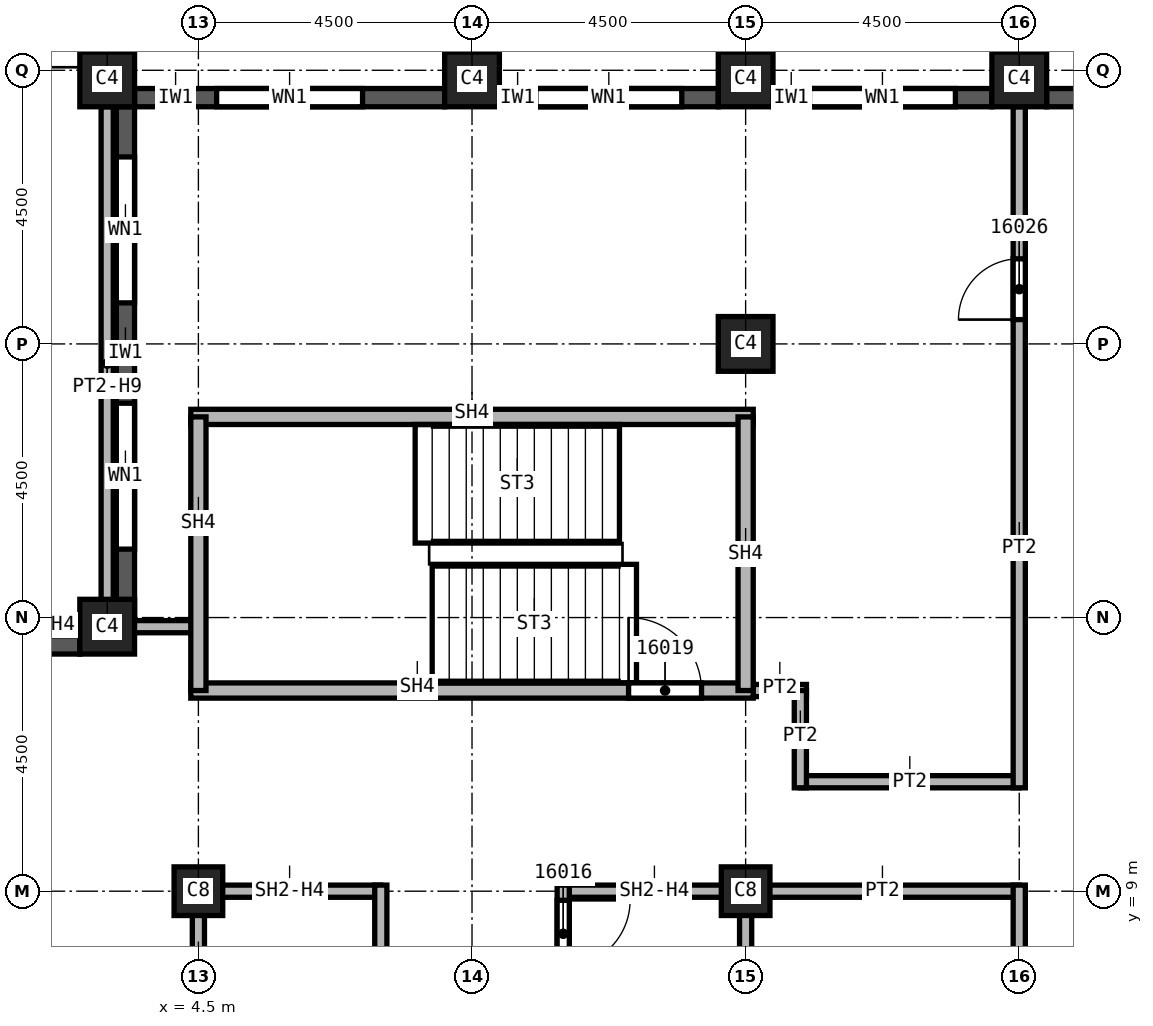
"""IFC4 building model, lengths in metres.
Left out: names, types, materials, properties, quantities, classifications, styles, units other than length and angle.
Written with IfcOpenShell. Run it as: python <this file> out.ifc"""

import sys

from ifc_helpers import new_model, si_unit, direction, frame, frame_2d, origin, origin_2d, place, context, subcontext, project, spatial, rectangle, extrude, element, fill, save


model = new_model("IFC4")
c1 = context("Model", 3, precision=1e-05, world=origin(), true_north=direction((0.0, 1.0)))
c2 = subcontext(c1, "Body", "Model", "MODEL_VIEW")
j1 = project(units=[si_unit("LENGTHUNIT", "METRE"), si_unit("PLANEANGLEUNIT", "RADIAN")], contexts=[c1])
p1 = place(None, origin())
s1 = spatial("IfcSite", under=j1, at=p1, CompositionType="ELEMENT")
p2 = place(p1, origin())
s2 = spatial("IfcBuilding", under=s1, at=p2, CompositionType="ELEMENT")
p3 = place(p2, frame((0.0, 0.0, 242.0)))
s3 = spatial("IfcBuildingStorey", under=s2, at=p3, CompositionType="ELEMENT", Elevation=242.0)
p4 = place(p3, frame((13.5, 18.0, 0.0), z_axis=(0.0, 0.0, 1.0), x_axis=(1.0, 0.0, 0.0)))
e1 = element("IfcColumn", 1, at=p4, inside=s3, PredefinedType="COLUMN", context=c2, shape_type="SweptSolid", body=[
    extrude(rectangle(XDim=0.9, YDim=0.9, at=origin_2d()), origin(), (0.0, 0.0, 1.0), 3.72),
])
for number, where, z_axis, x_axis in (
    (2, (4.5, 9.0, 0.0), (0.0, 0.0, 1.0), (1.0, 0.0, 0.0)),
    (3, (13.5, 9.0, 0.0), (0.0, 0.0, 1.0), (1.0, 0.0, 0.0)),
):
    element("IfcColumn", number, at=place(p3, frame(where, z_axis=z_axis, x_axis=x_axis)), inside=s3, PredefinedType="COLUMN", context=c2, shape_type="SweptSolid", body=[
        extrude(rectangle(XDim=0.8, YDim=0.8, at=origin_2d()), origin(), (0.0, 0.0, 1.0), 3.72),
    ])
for number, where, z_axis, x_axis in (
    (4, (3.0, 22.35, 0.0), (0.0, 0.0, 1.0), (1.0, 0.0, 0.0)),
    (5, (9.0, 22.35, 0.0), (0.0, 0.0, 1.0), (1.0, 0.0, 0.0)),
    (6, (13.5, 22.35, 0.0), (0.0, 0.0, 1.0), (1.0, 0.0, 0.0)),
    (7, (18.0, 22.35, 0.0), (0.0, 0.0, 1.0), (1.0, 0.0, 0.0)),
    (8, (3.0, 13.35, 0.0), (0.0, 0.0, 1.0), (1.0, 0.0, 0.0)),
):
    element("IfcColumn", number, at=place(p3, frame(where, z_axis=z_axis, x_axis=x_axis)), inside=s3, PredefinedType="COLUMN", context=c2, shape_type="SweptSolid", body=[
        extrude(rectangle(XDim=0.9, YDim=0.9, at=origin_2d()), origin(), (0.0, 0.0, 1.0), 3.72),
    ])
p5 = place(p3, frame((22.05, 22.05, 0.0), z_axis=(0.0, 0.0, 1.0), x_axis=(-1.0, 0.0, 0.0)))
e9 = element("IfcWall", 9, at=p5, inside=s3, PredefinedType="SOLIDWALL", context=c2, shape_type="SweptSolid", body=[
    extrude(rectangle(XDim=3.6, YDim=0.3, at=frame_2d((1.8, 0.0))), origin(), (0.0, 0.0, 1.0), 3.12),
])
p6 = place(p5, frame((0.775, 0.0, 0.8)))
e10 = element("IfcOpeningElement", 10, at=p6, cuts=e9, PredefinedType="OPENING", context=c2, shape_type="SweptSolid", body=[
    extrude(rectangle(XDim=1.0, YDim=1.95, at=frame_2d((0.5, 0.975))), frame((0.0, 0.15, 0.0), z_axis=(0.0, -1.0, 0.0), x_axis=(1.0, 0.0, 0.0)), (0.0, 0.0, 1.0), 0.3),
])
p7 = place(p5, frame((2.375, 0.0, 0.8)))
e11 = element("IfcOpeningElement", 11, at=p7, cuts=e9, PredefinedType="OPENING", context=c2, shape_type="SweptSolid", body=[
    extrude(rectangle(XDim=0.6, YDim=1.95, at=frame_2d((0.3, 0.975))), frame((0.0, 0.15, 0.0), z_axis=(0.0, -1.0, 0.0), x_axis=(1.0, 0.0, 0.0)), (0.0, 0.0, 1.0), 0.3),
])
p8 = place(p3, frame((17.55, 22.05, 0.0), z_axis=(0.0, 0.0, 1.0), x_axis=(-1.0, 0.0, 0.0)))
e12 = element("IfcWall", 12, at=p8, inside=s3, PredefinedType="SOLIDWALL", context=c2, shape_type="SweptSolid", body=[
    extrude(rectangle(XDim=3.6, YDim=0.3, at=frame_2d((1.8, 0.0))), origin(), (0.0, 0.0, 1.0), 3.12),
])
p9 = place(p8, frame((0.6, 0.0, 0.8)))
e13 = element("IfcOpeningElement", 13, at=p9, cuts=e12, PredefinedType="OPENING", context=c2, shape_type="SweptSolid", body=[
    extrude(rectangle(XDim=2.4, YDim=1.95, at=frame_2d((1.2, 0.975))), frame((0.0, 0.15, 0.0), z_axis=(0.0, -1.0, 0.0), x_axis=(1.0, 0.0, 0.0)), (0.0, 0.0, 1.0), 0.3),
])
p10 = place(p3, frame((13.05, 22.05, 0.0), z_axis=(0.0, 0.0, 1.0), x_axis=(-1.0, 0.0, 0.0)))
e14 = element("IfcWall", 14, at=p10, inside=s3, PredefinedType="SOLIDWALL", context=c2, shape_type="SweptSolid", body=[
    extrude(rectangle(XDim=3.6, YDim=0.3, at=frame_2d((1.8, 0.0))), origin(), (0.0, 0.0, 1.0), 3.12),
])
p11 = place(p10, frame((0.6, 0.0, 0.8)))
e15 = element("IfcOpeningElement", 15, at=p11, cuts=e14, PredefinedType="OPENING", context=c2, shape_type="SweptSolid", body=[
    extrude(rectangle(XDim=2.4, YDim=1.95, at=frame_2d((1.2, 0.975))), frame((0.0, 0.15, 0.0), z_axis=(0.0, -1.0, 0.0), x_axis=(1.0, 0.0, 0.0)), (0.0, 0.0, 1.0), 0.3),
])
p12 = place(p3, frame((8.55, 22.05, 0.0), z_axis=(0.0, 0.0, 1.0), x_axis=(-1.0, 0.0, 0.0)))
e16 = element("IfcWall", 16, at=p12, inside=s3, PredefinedType="SOLIDWALL", context=c2, shape_type="SweptSolid", body=[
    extrude(rectangle(XDim=5.1, YDim=0.3, at=frame_2d((2.55, 0.0))), origin(), (0.0, 0.0, 1.0), 3.12),
])
p13 = place(p12, frame((1.35, 0.0, 0.8)))
e17 = element("IfcOpeningElement", 17, at=p13, cuts=e16, PredefinedType="OPENING", context=c2, shape_type="SweptSolid", body=[
    extrude(rectangle(XDim=2.4, YDim=1.95, at=frame_2d((1.2, 0.975))), frame((0.0, 0.15, 0.0), z_axis=(0.0, -1.0, 0.0), x_axis=(1.0, 0.0, 0.0)), (0.0, 0.0, 1.0), 0.3),
])
p14 = place(p3, frame((3.3, 21.9, 0.0), z_axis=(0.0, 0.0, 1.0), x_axis=(0.0, -1.0, 0.0)))
e18 = element("IfcWall", 18, at=p14, inside=s3, PredefinedType="SOLIDWALL", context=c2, shape_type="SweptSolid", body=[
    extrude(rectangle(XDim=8.5, YDim=0.3, at=frame_2d((4.25, 0.0))), origin(), (0.0, 0.0, 1.0), 3.12),
])
p15 = place(p14, frame((0.825, 0.0, 0.8)))
e19 = element("IfcOpeningElement", 19, at=p15, cuts=e18, PredefinedType="OPENING", context=c2, shape_type="SweptSolid", body=[
    extrude(rectangle(XDim=2.4, YDim=1.95, at=frame_2d((1.2, 0.975))), frame((0.0, 0.15, 0.0), z_axis=(0.0, -1.0, 0.0), x_axis=(1.0, 0.0, 0.0)), (0.0, 0.0, 1.0), 0.3),
])
p16 = place(p14, frame((4.875, 0.0, 0.8)))
e20 = element("IfcOpeningElement", 20, at=p16, cuts=e18, PredefinedType="OPENING", context=c2, shape_type="SweptSolid", body=[
    extrude(rectangle(XDim=2.4, YDim=1.95, at=frame_2d((1.2, 0.975))), frame((0.0, 0.15, 0.0), z_axis=(0.0, -1.0, 0.0), x_axis=(1.0, 0.0, 0.0)), (0.0, 0.0, 1.0), 0.3),
])
p17 = place(p3, frame((-2.55, 13.05, 0.0), z_axis=(0.0, 0.0, 1.0), x_axis=(1.0, 0.0, 0.0)))
e21 = element("IfcWall", 21, at=p17, inside=s3, PredefinedType="SOLIDWALL", context=c2, shape_type="SweptSolid", body=[
    extrude(rectangle(XDim=5.1, YDim=0.3, at=frame_2d((2.55, 0.0))), origin(), (0.0, 0.0, 1.0), 3.12),
])
p18 = place(p17, frame((1.95, 0.0, 0.0)))
e22 = element("IfcOpeningElement", 22, at=p18, cuts=e21, PredefinedType="OPENING", context=c2, shape_type="SweptSolid", body=[
    extrude(rectangle(XDim=1.2, YDim=2.4, at=frame_2d((0.6, 1.2))), frame((0.0, 0.15, 0.0), z_axis=(0.0, -1.0, 0.0), x_axis=(1.0, 0.0, 0.0)), (0.0, 0.0, 1.0), 0.3),
])
p19 = place(p3, frame((0.9, 13.35, 0.0), z_axis=(0.0, 0.0, 1.0), x_axis=(1.0, 0.0, 0.0)))
e23 = element("IfcWall", 23, at=p19, inside=s3, PredefinedType="PARTITIONING", context=c2, shape_type="SweptSolid", body=[
    extrude(rectangle(XDim=3.6, YDim=0.2, at=frame_2d((1.8, 0.0))), origin(), (0.0, 0.0, 1.0), 3.118),
])
p20 = place(p3, frame((3.0, 21.9, 0.0), z_axis=(0.0, 0.0, 1.0), x_axis=(0.0, -1.0, 0.0)))
e24 = element("IfcWall", 24, at=p20, inside=s3, PredefinedType="PARTITIONING", context=c2, shape_type="SweptSolid", body=[
    extrude(rectangle(XDim=8.55, YDim=0.2, at=frame_2d((4.275, 0.0))), origin(), (0.0, 0.0, 1.0), 2.874),
])
p21 = place(p3, frame((13.375, 12.3, 0.0), z_axis=(0.0, 0.0, 1.0), x_axis=(1.0, 0.0, 0.0)))
e25 = element("IfcWall", 25, at=p21, inside=s3, PredefinedType="PARTITIONING", context=c2, shape_type="SweptSolid", body=[
    extrude(rectangle(XDim=1.125, YDim=0.2, at=frame_2d((0.562, 0.0))), origin(), (0.0, 0.0, 1.0), 3.72),
])
p22 = place(p3, frame((18.0, 9.0, 0.0), z_axis=(0.0, 0.0, 1.0), x_axis=(-1.0, 0.0, 0.0)))
e26 = element("IfcWall", 26, at=p22, inside=s3, PredefinedType="PARTITIONING", context=c2, shape_type="SweptSolid", body=[
    extrude(rectangle(XDim=4.5, YDim=0.2, at=frame_2d((2.25, 0.0))), origin(), (0.0, 0.0, 1.0), 3.72),
])
p23 = place(p3, frame((14.4, 10.8, 0.0), z_axis=(0.0, 0.0, 1.0), x_axis=(1.0, 0.0, 0.0)))
e27 = element("IfcWall", 27, at=p23, inside=s3, PredefinedType="PARTITIONING", context=c2, shape_type="SweptSolid", body=[
    extrude(rectangle(XDim=3.6, YDim=0.2, at=frame_2d((1.8, 0.0))), origin(), (0.0, 0.0, 1.0), 3.72),
])
p24 = place(p3, frame((14.4, 12.3, 0.0), z_axis=(0.0, 0.0, 1.0), x_axis=(0.0, -1.0, 0.0)))
e28 = element("IfcWall", 28, at=p24, inside=s3, PredefinedType="PARTITIONING", context=c2, shape_type="SweptSolid", body=[
    extrude(rectangle(XDim=1.6, YDim=0.2, at=frame_2d((0.8, 0.0))), origin(), (0.0, 0.0, 1.0), 3.72),
])
p25 = place(p3, frame((18.0, -9.1, 0.0), z_axis=(0.0, 0.0, 1.0), x_axis=(0.0, 1.0, 0.0)))
e29 = element("IfcWall", 29, at=p25, inside=s3, PredefinedType="PARTITIONING", context=c2, shape_type="SweptSolid", body=[
    extrude(rectangle(XDim=18.2, YDim=0.2, at=frame_2d((9.1, 0.0))), origin(), (0.0, 0.0, 1.0), 3.72),
])
p26 = place(p25, frame((4.6, 0.0, 0.0)))
e30 = element("IfcOpeningElement", 30, at=p26, cuts=e29, PredefinedType="OPENING", context=c2, shape_type="SweptSolid", body=[
    extrude(rectangle(XDim=1.0, YDim=2.1, at=frame_2d((0.5, 1.05))), frame((0.0, 0.1, 0.0), z_axis=(0.0, -1.0, 0.0), x_axis=(1.0, 0.0, 0.0)), (0.0, 0.0, 1.0), 0.2),
])
p27 = place(p25, frame((13.75, 0.0, 0.0)))
e31 = element("IfcOpeningElement", 31, at=p27, cuts=e29, PredefinedType="OPENING", context=c2, shape_type="SweptSolid", body=[
    extrude(rectangle(XDim=1.0, YDim=2.1, at=frame_2d((0.5, 1.05))), frame((0.0, 0.1, 0.0), z_axis=(0.0, -1.0, 0.0), x_axis=(1.0, 0.0, 0.0)), (0.0, 0.0, 1.0), 0.2),
])
p28 = place(p3, frame((18.0, 10.7, 0.0), z_axis=(0.0, 0.0, 1.0), x_axis=(0.0, 1.0, 0.0)))
e32 = element("IfcWall", 32, at=p28, inside=s3, PredefinedType="PARTITIONING", context=c2, shape_type="SweptSolid", body=[
    extrude(rectangle(XDim=11.2, YDim=0.2, at=frame_2d((5.6, 0.0))), origin(), (0.0, 0.0, 1.0), 3.72),
])
p29 = place(p28, frame((7.7, 0.0, 0.0)))
e33 = element("IfcOpeningElement", 33, at=p29, cuts=e32, PredefinedType="OPENING", context=c2, shape_type="SweptSolid", body=[
    extrude(rectangle(XDim=1.0, YDim=2.1, at=frame_2d((0.5, 1.05))), frame((0.0, 0.1, 0.0), z_axis=(0.0, -1.0, 0.0), x_axis=(1.0, 0.0, 0.0)), (0.0, 0.0, 1.0), 0.2),
])
p30 = place(p3, frame((4.5, 0.0, 0.0), z_axis=(0.0, 0.0, 1.0), x_axis=(0.0, 1.0, 0.0)))
e34 = element("IfcWall", 34, at=p30, inside=s3, PredefinedType="SOLIDWALL", context=c2, shape_type="SweptSolid", body=[
    extrude(rectangle(XDim=9.1, YDim=0.2, at=frame_2d((4.55, 0.0))), origin(), (0.0, 0.0, 1.0), 3.042),
])
p31 = place(p30, frame((1.6, 0.0, 0.0)))
e35 = element("IfcOpeningElement", 35, at=p31, cuts=e34, PredefinedType="OPENING", context=c2, shape_type="SweptSolid", body=[
    extrude(rectangle(XDim=1.1, YDim=2.1, at=frame_2d((0.55, 1.05))), frame((0.0, 0.1, 0.0), z_axis=(0.0, -1.0, 0.0), x_axis=(1.0, 0.0, 0.0)), (0.0, 0.0, 1.0), 0.2),
])
p32 = place(p30, frame((5.5, 0.0, 0.0)))
e36 = element("IfcOpeningElement", 36, at=p32, cuts=e34, PredefinedType="OPENING", context=c2, shape_type="SweptSolid", body=[
    extrude(rectangle(XDim=1.1, YDim=2.1, at=frame_2d((0.55, 1.05))), frame((0.0, 0.1, 0.0), z_axis=(0.0, -1.0, 0.0), x_axis=(1.0, 0.0, 0.0)), (0.0, 0.0, 1.0), 0.2),
])
p33 = place(p3, frame((4.5, 9.0, 0.0), z_axis=(0.0, 0.0, 1.0), x_axis=(1.0, 0.0, 0.0)))
e37 = element("IfcWall", 37, at=p33, inside=s3, PredefinedType="SOLIDWALL", context=c2, shape_type="SweptSolid", body=[
    extrude(rectangle(XDim=3.0, YDim=0.2, at=frame_2d((1.5, 0.0))), origin(), (0.0, 0.0, 1.0), 3.042),
])
p34 = place(p3, frame((7.5, 9.1, 0.0), z_axis=(0.0, 0.0, 1.0), x_axis=(0.0, -1.0, 0.0)))
e38 = element("IfcWall", 38, at=p34, inside=s3, PredefinedType="SOLIDWALL", context=c2, shape_type="SweptSolid", body=[
    extrude(rectangle(XDim=6.225, YDim=0.2, at=frame_2d((3.113, 0.0))), origin(), (0.0, 0.0, 1.0), 3.72),
])
p35 = place(p3, frame((10.5, 9.0, 0.0), z_axis=(0.0, 0.0, 1.0), x_axis=(1.0, 0.0, 0.0)))
e39 = element("IfcWall", 39, at=p35, inside=s3, PredefinedType="SOLIDWALL", context=c2, shape_type="SweptSolid", body=[
    extrude(rectangle(XDim=3.1, YDim=0.2, at=frame_2d((1.55, 0.0))), origin(), (0.0, 0.0, 1.0), 3.042),
])
p36 = place(p3, frame((10.5, 9.1, 0.0), z_axis=(0.0, 0.0, 1.0), x_axis=(0.0, -1.0, 0.0)))
e40 = element("IfcWall", 40, at=p36, inside=s3, PredefinedType="SOLIDWALL", context=c2, shape_type="SweptSolid", body=[
    extrude(rectangle(XDim=3.225, YDim=0.2, at=frame_2d((1.613, 0.0))), origin(), (0.0, 0.0, 1.0), 3.72),
])
p37 = place(p36, frame((0.25, 0.0, 0.0)))
e41 = element("IfcOpeningElement", 41, at=p37, cuts=e40, PredefinedType="OPENING", context=c2, shape_type="SweptSolid", body=[
    extrude(rectangle(XDim=1.1, YDim=2.1, at=frame_2d((0.55, 1.05))), frame((0.0, 0.1, 0.0), z_axis=(0.0, -1.0, 0.0), x_axis=(1.0, 0.0, 0.0)), (0.0, 0.0, 1.0), 0.2),
])
p38 = place(p3, frame((13.5, 9.1, 0.0), z_axis=(0.0, 0.0, 1.0), x_axis=(0.0, -1.0, 0.0)))
e42 = element("IfcWall", 42, at=p38, inside=s3, PredefinedType="SOLIDWALL", context=c2, shape_type="SweptSolid", body=[
    extrude(rectangle(XDim=3.1, YDim=0.2, at=frame_2d((1.55, 0.0))), origin(), (0.0, 0.0, 1.0), 3.042),
])
p39 = place(p3, frame((4.375, 12.3, 0.0), z_axis=(0.0, 0.0, 1.0), x_axis=(1.0, 0.0, 0.0)))
e43 = element("IfcWall", 43, at=p39, inside=s3, PredefinedType="SOLIDWALL", context=c2, shape_type="SweptSolid", body=[
    extrude(rectangle(XDim=9.25, YDim=0.25, at=frame_2d((4.625, 0.0))), origin(), (0.0, 0.0, 1.0), 3.72),
])
p40 = place(p39, frame((7.2, 0.0, 0.0)))
e44 = element("IfcOpeningElement", 44, at=p40, cuts=e43, PredefinedType="OPENING", context=c2, shape_type="SweptSolid", body=[
    extrude(rectangle(XDim=1.2, YDim=2.1, at=frame_2d((0.6, 1.05))), frame((0.0, 0.125, 0.0), z_axis=(0.0, -1.0, 0.0), x_axis=(1.0, 0.0, 0.0)), (0.0, 0.0, 1.0), 0.25),
])
p41 = place(p3, frame((4.375, 16.8, 0.0), z_axis=(0.0, 0.0, 1.0), x_axis=(1.0, 0.0, 0.0)))
e45 = element("IfcWall", 45, at=p41, inside=s3, PredefinedType="SOLIDWALL", context=c2, shape_type="SweptSolid", body=[
    extrude(rectangle(XDim=9.25, YDim=0.25, at=frame_2d((4.625, 0.0))), origin(), (0.0, 0.0, 1.0), 3.72),
])
for number, where, z_axis, x_axis in (
    (46, (4.5, 12.3, 0.0), (0.0, 0.0, 1.0), (0.0, 1.0, 0.0)),
    (47, (13.5, 16.8, 0.0), (0.0, 0.0, 1.0), (0.0, -1.0, 0.0)),
):
    element("IfcWall", number, at=place(p3, frame(where, z_axis=z_axis, x_axis=x_axis)), inside=s3, PredefinedType="SOLIDWALL", context=c2, shape_type="SweptSolid", body=[
        extrude(rectangle(XDim=4.5, YDim=0.25, at=frame_2d((2.25, 0.0))), origin(), (0.0, 0.0, 1.0), 3.72),
    ])
p42 = place(p9, origin())
e48 = element("IfcWindow", 48, at=p42, inside=s3, PartitioningType="SINGLE_PANEL", PredefinedType="WINDOW", context=c2, shape_type="SweptSolid", body=[
    extrude(rectangle(XDim=2.4, YDim=1.95, at=frame_2d((1.2, 0.975))), frame((0.0, 0.03, 0.0), z_axis=(0.0, -1.0, 0.0), x_axis=(1.0, 0.0, 0.0)), (0.0, 0.0, 1.0), 0.06),
])
fill(e13, e48)
p43 = place(p11, origin())
e49 = element("IfcWindow", 49, at=p43, inside=s3, PartitioningType="SINGLE_PANEL", PredefinedType="WINDOW", context=c2, shape_type="SweptSolid", body=[
    extrude(rectangle(XDim=2.4, YDim=1.95, at=frame_2d((1.2, 0.975))), frame((0.0, 0.03, 0.0), z_axis=(0.0, -1.0, 0.0), x_axis=(1.0, 0.0, 0.0)), (0.0, 0.0, 1.0), 0.06),
])
fill(e15, e49)
p44 = place(p13, origin())
e50 = element("IfcWindow", 50, at=p44, inside=s3, PartitioningType="SINGLE_PANEL", PredefinedType="WINDOW", context=c2, shape_type="SweptSolid", body=[
    extrude(rectangle(XDim=2.4, YDim=1.95, at=frame_2d((1.2, 0.975))), frame((0.0, 0.03, 0.0), z_axis=(0.0, -1.0, 0.0), x_axis=(1.0, 0.0, 0.0)), (0.0, 0.0, 1.0), 0.06),
])
fill(e17, e50)
p45 = place(p15, origin())
e51 = element("IfcWindow", 51, at=p45, inside=s3, PartitioningType="SINGLE_PANEL", PredefinedType="WINDOW", context=c2, shape_type="SweptSolid", body=[
    extrude(rectangle(XDim=2.4, YDim=1.95, at=frame_2d((1.2, 0.975))), frame((0.0, 0.03, 0.0), z_axis=(0.0, -1.0, 0.0), x_axis=(1.0, 0.0, 0.0)), (0.0, 0.0, 1.0), 0.06),
])
fill(e19, e51)
p46 = place(p16, origin())
e52 = element("IfcWindow", 52, at=p46, inside=s3, PartitioningType="SINGLE_PANEL", PredefinedType="WINDOW", context=c2, shape_type="SweptSolid", body=[
    extrude(rectangle(XDim=2.4, YDim=1.95, at=frame_2d((1.2, 0.975))), frame((0.0, 0.03, 0.0), z_axis=(0.0, -1.0, 0.0), x_axis=(1.0, 0.0, 0.0)), (0.0, 0.0, 1.0), 0.06),
])
fill(e20, e52)
p47 = place(p37, origin())
e53 = element("IfcDoor", 53, at=p47, inside=s3, OperationType="SINGLE_SWING_LEFT", PredefinedType="DOOR", context=c2, shape_type="SweptSolid", body=[
    extrude(rectangle(XDim=1.1, YDim=2.1, at=frame_2d((0.55, 1.05))), frame((0.0, 0.025, 0.0), z_axis=(0.0, -1.0, 0.0), x_axis=(1.0, 0.0, 0.0)), (0.0, 0.0, 1.0), 0.05),
])
fill(e41, e53)
p48 = place(p40, origin())
e54 = element("IfcDoor", 54, at=p48, inside=s3, OperationType="SINGLE_SWING_RIGHT", PredefinedType="DOOR", context=c2, shape_type="SweptSolid", body=[
    extrude(rectangle(XDim=1.2, YDim=2.1, at=frame_2d((0.6, 1.05))), frame((0.0, 0.025, 0.0), z_axis=(0.0, -1.0, 0.0), x_axis=(1.0, 0.0, 0.0)), (0.0, 0.0, 1.0), 0.05),
])
fill(e44, e54)
p49 = place(p29, origin())
e55 = element("IfcDoor", 55, at=p49, inside=s3, OperationType="SINGLE_SWING_LEFT", PredefinedType="DOOR", context=c2, shape_type="SweptSolid", body=[
    extrude(rectangle(XDim=1.0, YDim=2.1, at=frame_2d((0.5, 1.05))), frame((0.0, 0.025, 0.0), z_axis=(0.0, -1.0, 0.0), x_axis=(1.0, 0.0, 0.0)), (0.0, 0.0, 1.0), 0.05),
])
fill(e33, e55)
save(model, sys.argv[1])
